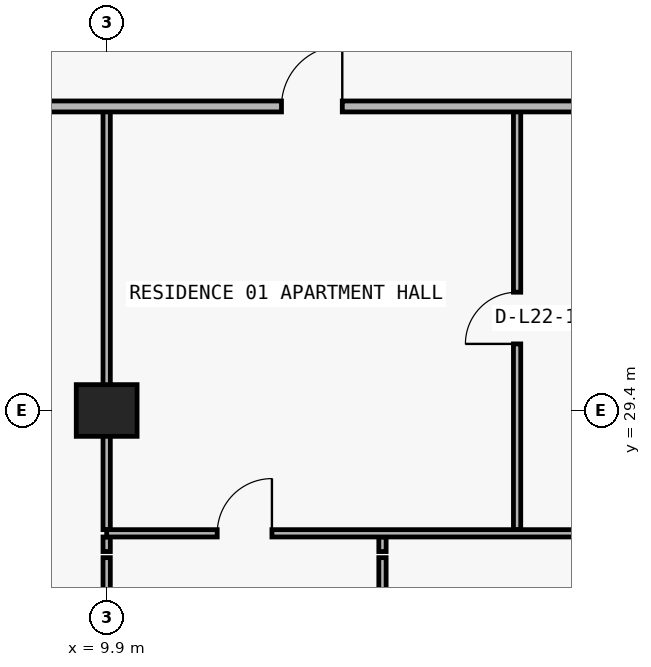
"""IFC4 building model, lengths in metres.
Left out: names, types, materials, properties, quantities, classifications, styles, units other than length and angle.
Written with IfcOpenShell. Run it as: python <this file> out.ifc"""

import sys

from ifc_helpers import new_model, si_unit, direction, frame, frame_2d, origin, origin_2d, place, context, subcontext, project, spatial, rectangle, extrude, element, fill, save


model = new_model("IFC4")
c1 = context("Model", 3, precision=1e-05, world=origin(), true_north=direction((0.0, 1.0)))
c2 = subcontext(c1, "Body", "Model", "MODEL_VIEW")
j1 = project(units=[si_unit("LENGTHUNIT", "METRE"), si_unit("PLANEANGLEUNIT", "RADIAN")], contexts=[c1])
p1 = place(None, origin())
s1 = spatial("IfcSite", under=j1, at=p1, CompositionType="ELEMENT")
p2 = place(p1, origin())
s2 = spatial("IfcBuilding", under=s1, at=p2, CompositionType="ELEMENT")
p3 = place(p2, frame((0.0, 0.0, 84.6)))
s3 = spatial("IfcBuildingStorey", under=s2, at=p3, CompositionType="ELEMENT", Elevation=84.6)
p4 = place(p3, frame((9.9, 29.4, 0.0), z_axis=(0.0, 0.0, 1.0), x_axis=(1.0, 0.0, 0.0)))
e1 = element("IfcColumn", 1, at=p4, inside=s3, PredefinedType="COLUMN", context=c2, shape_type="SweptSolid", body=[
    extrude(rectangle(XDim=1.0, YDim=0.85, at=origin_2d()), origin(), (0.0, 0.0, 1.0), 3.05),
])
p5 = place(p3, frame((9.9, 22.29, 0.0), z_axis=(0.0, 0.0, 1.0), x_axis=(0.0, 1.0, 0.0)))
e2 = element("IfcWall", 2, at=p5, inside=s3, PredefinedType="PARTITIONING", context=c2, shape_type="SweptSolid", body=[
    extrude(rectangle(XDim=4.69, YDim=0.12, at=frame_2d((2.345, 0.0))), origin(), (0.0, 0.0, 1.0), 2.174),
])
p6 = place(p5, frame((1.895, 0.0, 0.0)))
e3 = element("IfcOpeningElement", 3, at=p6, cuts=e2, PredefinedType="OPENING", context=c2, shape_type="SweptSolid", body=[
    extrude(rectangle(XDim=0.9, YDim=2.124, at=frame_2d((0.45, 1.062))), frame((0.0, 0.07, 0.0), z_axis=(0.0, -1.0, 0.0), x_axis=(1.0, 0.0, 0.0)), (0.0, 0.0, 1.0), 0.14),
])
p7 = place(p3, frame((9.9, 27.08, 0.0), z_axis=(0.0, 0.0, 1.0), x_axis=(0.0, 1.0, 0.0)))
e4 = element("IfcWall", 4, at=p7, inside=s3, PredefinedType="PARTITIONING", context=c2, shape_type="SweptSolid", body=[
    extrude(rectangle(XDim=0.24, YDim=0.12, at=frame_2d((0.12, 0.0))), origin(), (0.0, 0.0, 1.0), 2.174),
])
p8 = place(p3, frame((9.9, 27.44, 0.0), z_axis=(0.0, 0.0, 1.0), x_axis=(0.0, 1.0, 0.0)))
e5 = element("IfcWall", 5, at=p8, inside=s3, PredefinedType="PARTITIONING", context=c2, shape_type="SweptSolid", body=[
    extrude(rectangle(XDim=6.96, YDim=0.12, at=frame_2d((3.48, 0.0))), origin(), (0.0, 0.0, 1.0), 2.174),
])
p9 = place(p3, frame((14.436, 22.29, 0.0), z_axis=(0.0, 0.0, 1.0), x_axis=(0.0, 1.0, 0.0)))
e6 = element("IfcWall", 6, at=p9, inside=s3, PredefinedType="PARTITIONING", context=c2, shape_type="SweptSolid", body=[
    extrude(rectangle(XDim=4.69, YDim=0.12, at=frame_2d((2.345, 0.0))), origin(), (0.0, 0.0, 1.0), 3.05),
])
p10 = place(p9, frame((1.895, 0.0, 0.0)))
e7 = element("IfcOpeningElement", 7, at=p10, cuts=e6, PredefinedType="OPENING", context=c2, shape_type="SweptSolid", body=[
    extrude(rectangle(XDim=0.9, YDim=2.15, at=frame_2d((0.45, 1.075))), frame((0.0, 0.07, 0.0), z_axis=(0.0, -1.0, 0.0), x_axis=(1.0, 0.0, 0.0)), (0.0, 0.0, 1.0), 0.14),
])
p11 = place(p3, frame((14.436, 27.08, 0.0), z_axis=(0.0, 0.0, 1.0), x_axis=(0.0, 1.0, 0.0)))
e8 = element("IfcWall", 8, at=p11, inside=s3, PredefinedType="PARTITIONING", context=c2, shape_type="SweptSolid", body=[
    extrude(rectangle(XDim=0.24, YDim=0.12, at=frame_2d((0.12, 0.0))), origin(), (0.0, 0.0, 1.0), 3.05),
])
p12 = place(p3, frame((16.65, 27.44, 0.0), z_axis=(0.0, 0.0, 1.0), x_axis=(0.0, 1.0, 0.0)))
e9 = element("IfcWall", 9, at=p12, inside=s3, PredefinedType="PARTITIONING", context=c2, shape_type="SweptSolid", body=[
    extrude(rectangle(XDim=6.96, YDim=0.12, at=frame_2d((3.48, 0.0))), origin(), (0.0, 0.0, 1.0), 3.05),
])
p13 = place(p12, frame((3.055, 0.0, 0.0)))
e10 = element("IfcOpeningElement", 10, at=p13, cuts=e9, PredefinedType="OPENING", context=c2, shape_type="SweptSolid", body=[
    extrude(rectangle(XDim=0.85, YDim=2.1, at=frame_2d((0.425, 1.05))), frame((0.0, 0.07, 0.0), z_axis=(0.0, -1.0, 0.0), x_axis=(1.0, 0.0, 0.0)), (0.0, 0.0, 1.0), 0.14),
])
p14 = place(p3, frame((9.9, 27.38, 0.0), z_axis=(0.0, 0.0, 1.0), x_axis=(1.0, 0.0, 0.0)))
e11 = element("IfcWall", 11, at=p14, inside=s3, PredefinedType="PARTITIONING", context=c2, shape_type="SweptSolid", body=[
    extrude(rectangle(XDim=8.35, YDim=0.12, at=frame_2d((4.175, 0.0))), origin(), (0.0, 0.0, 1.0), 3.05),
])
p15 = place(p14, frame((1.818, 0.0, 0.0)))
e12 = element("IfcOpeningElement", 12, at=p15, cuts=e11, PredefinedType="OPENING", context=c2, shape_type="SweptSolid", body=[
    extrude(rectangle(XDim=0.9, YDim=2.15, at=frame_2d((0.45, 1.075))), frame((0.0, 0.07, 0.0), z_axis=(0.0, -1.0, 0.0), x_axis=(1.0, 0.0, 0.0)), (0.0, 0.0, 1.0), 0.14),
])
p16 = place(p3, frame((7.705, 34.4, 0.0), z_axis=(0.0, 0.0, 1.0), x_axis=(1.0, 0.0, 0.0)))
e13 = element("IfcWall", 13, at=p16, inside=s3, PredefinedType="PARTITIONING", context=c2, shape_type="SweptSolid", body=[
    extrude(rectangle(XDim=10.545, YDim=0.18, at=frame_2d((5.272, 0.0))), origin(), (0.0, 0.0, 1.0), 3.05),
])
p17 = place(p16, frame((5.07, 0.0, 0.0)))
e14 = element("IfcOpeningElement", 14, at=p17, cuts=e13, PredefinedType="OPENING", context=c2, shape_type="SweptSolid", body=[
    extrude(rectangle(XDim=1.0, YDim=2.2, at=frame_2d((0.5, 1.1))), frame((0.0, 0.1, 0.0), z_axis=(0.0, -1.0, 0.0), x_axis=(1.0, 0.0, 0.0)), (0.0, 0.0, 1.0), 0.2),
])
p18 = place(p17, origin())
e15 = element("IfcDoor", 15, at=p18, inside=s3, OperationType="SINGLE_SWING_RIGHT", PredefinedType="DOOR", context=c2, shape_type="SweptSolid", body=[
    extrude(rectangle(XDim=1.0, YDim=2.2, at=frame_2d((0.5, 1.1))), frame((0.0, 0.025, 0.0), z_axis=(0.0, -1.0, 0.0), x_axis=(1.0, 0.0, 0.0)), (0.0, 0.0, 1.0), 0.05),
])
fill(e14, e15)
p19 = place(p13, origin())
e16 = element("IfcDoor", 16, at=p19, inside=s3, OperationType="SINGLE_SWING_LEFT", PredefinedType="DOOR", context=c2, shape_type="SweptSolid", body=[
    extrude(rectangle(XDim=0.85, YDim=2.1, at=frame_2d((0.425, 1.05))), frame((0.0, 0.025, 0.0), z_axis=(0.0, -1.0, 0.0), x_axis=(1.0, 0.0, 0.0)), (0.0, 0.0, 1.0), 0.05),
])
fill(e10, e16)
p20 = place(p15, origin())
e17 = element("IfcDoor", 17, at=p20, inside=s3, OperationType="SINGLE_SWING_RIGHT", PredefinedType="DOOR", context=c2, shape_type="SweptSolid", body=[
    extrude(rectangle(XDim=0.9, YDim=2.15, at=frame_2d((0.45, 1.075))), frame((0.0, 0.025, 0.0), z_axis=(0.0, -1.0, 0.0), x_axis=(1.0, 0.0, 0.0)), (0.0, 0.0, 1.0), 0.05),
])
fill(e12, e17)
save(model, sys.argv[1])
